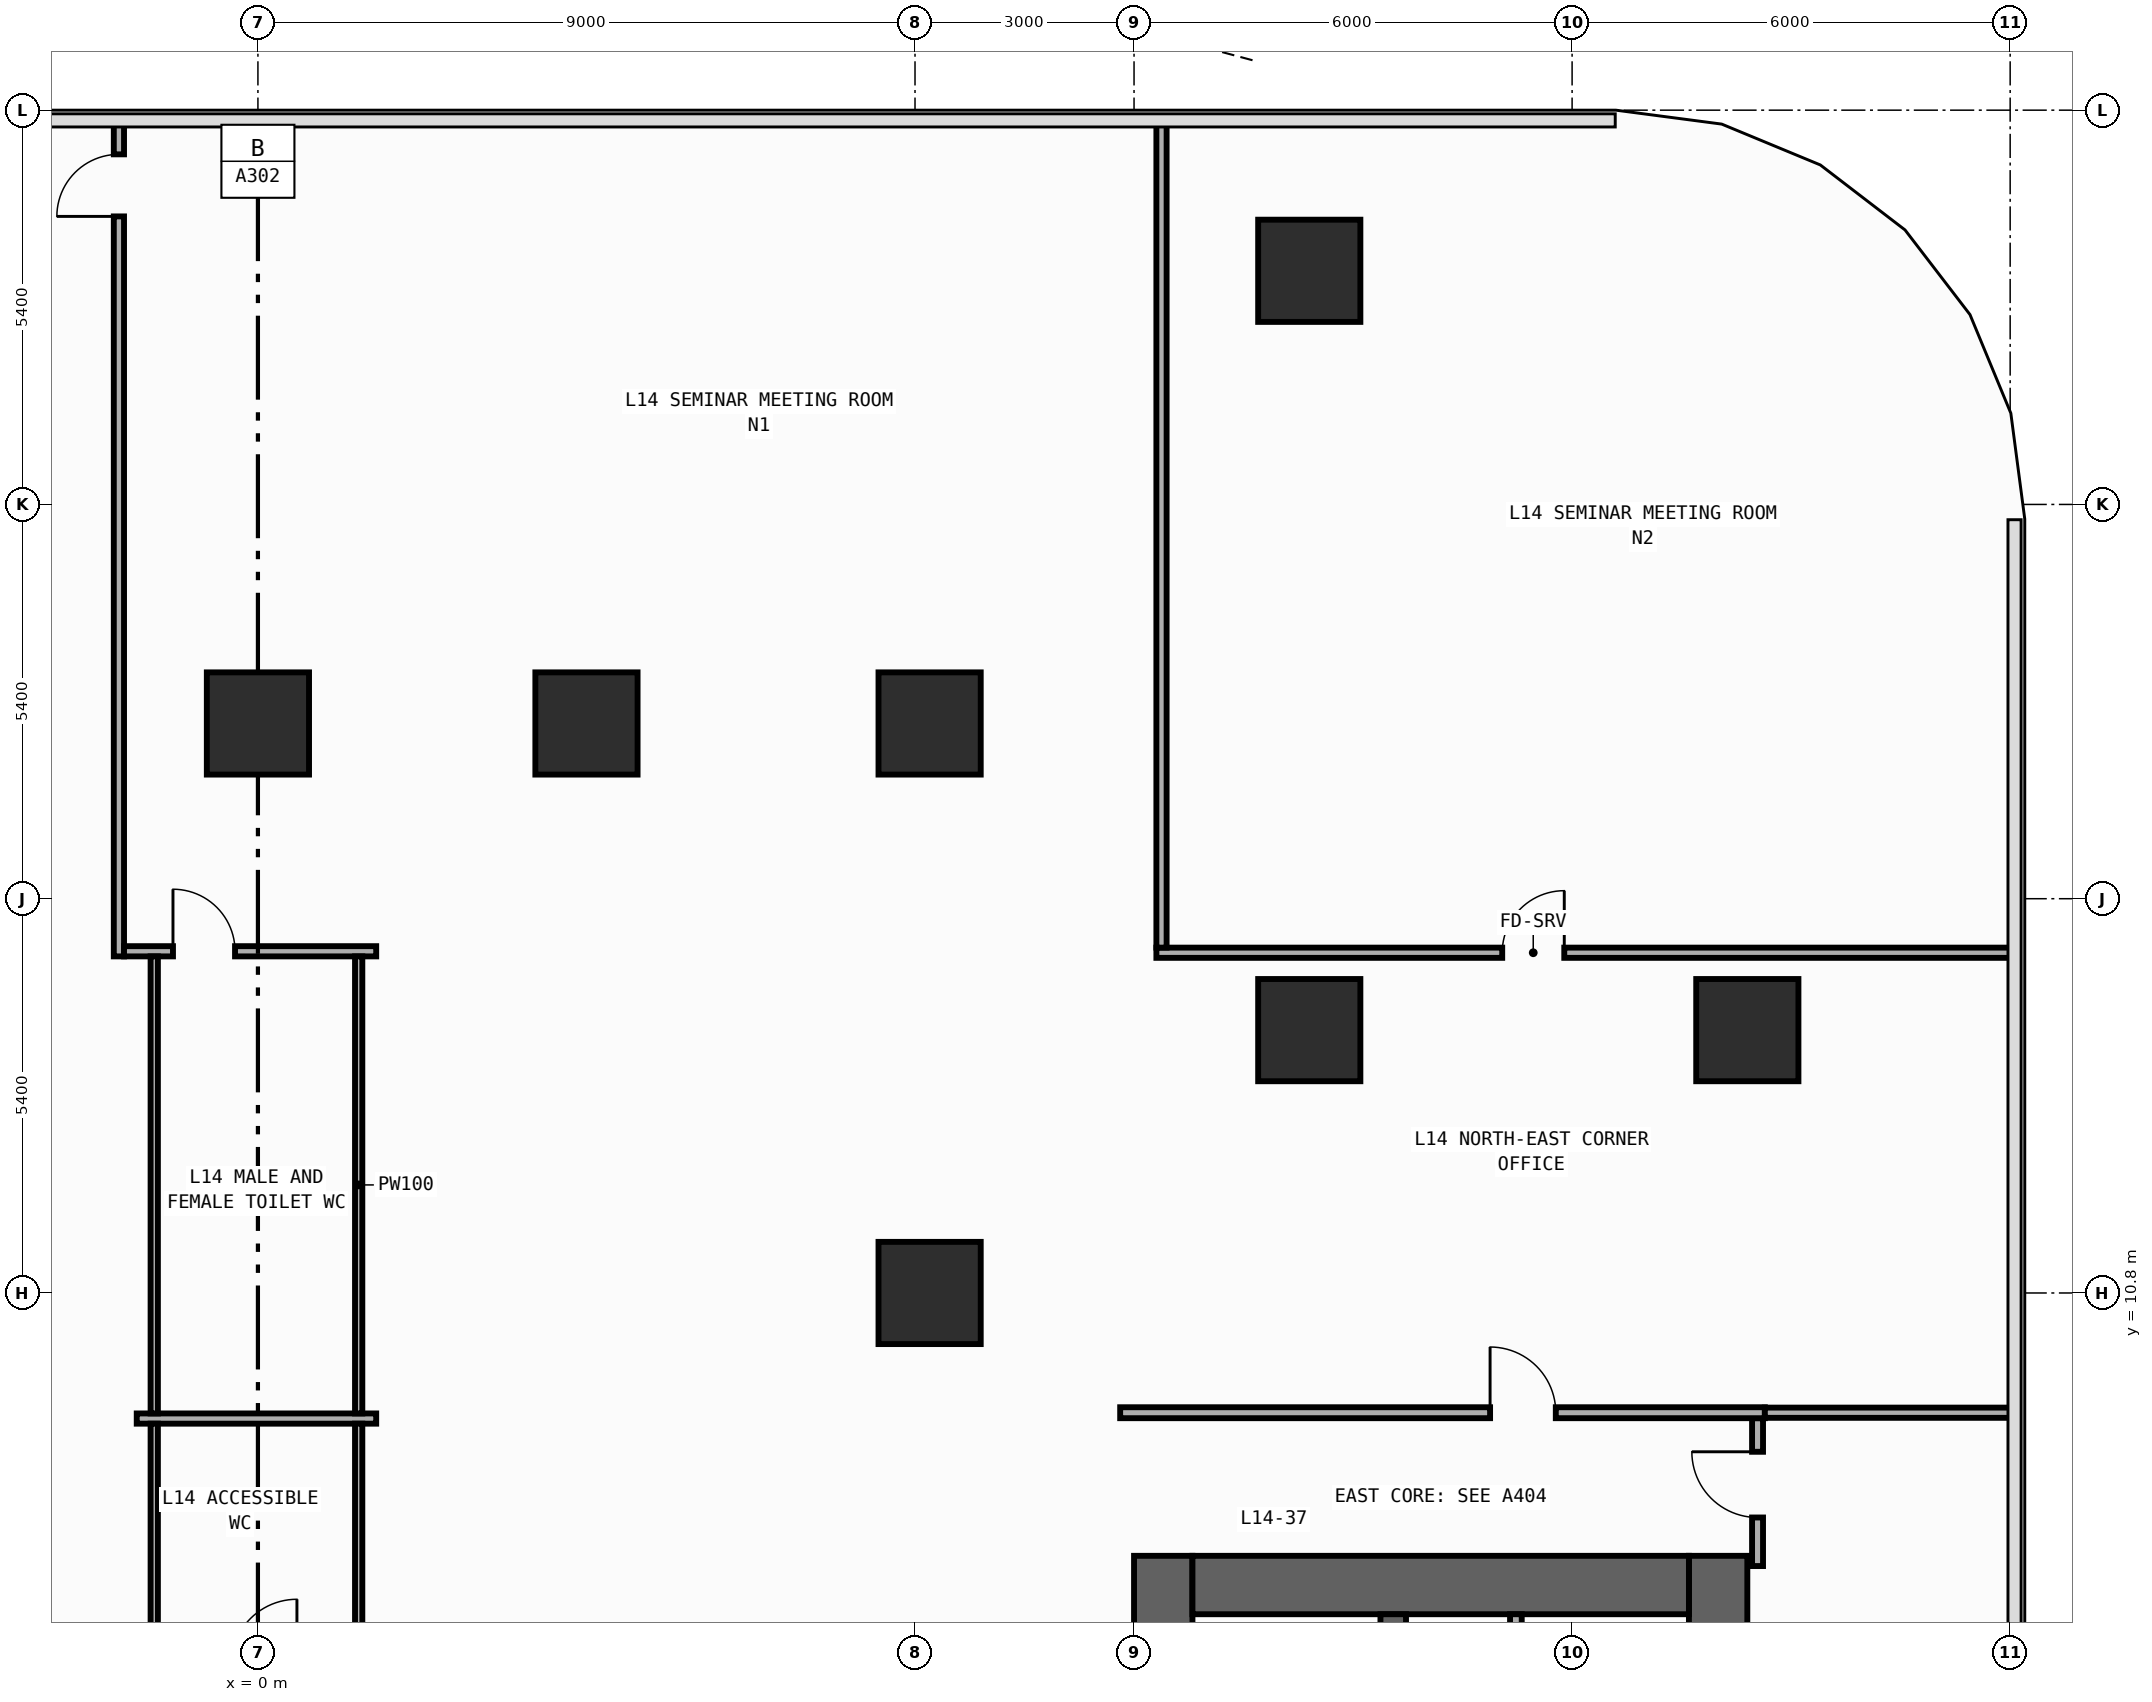
"""IFC4 building model, lengths in metres.
Left out: names, types, materials, properties, quantities, classifications, styles, units other than length and angle.
Written with IfcOpenShell. Run it as: python <this file> out.ifc"""

import sys

from ifc_helpers import new_model, si_unit, direction, frame, frame_2d, origin, origin_2d, place, context, subcontext, project, spatial, rectangle, extrude, element, fill, save


model = new_model("IFC4")
c1 = context("Model", 3, precision=1e-05, world=origin(), true_north=direction((0.0, 1.0)))
c2 = subcontext(c1, "Body", "Model", "MODEL_VIEW")
j1 = project(units=[si_unit("LENGTHUNIT", "METRE"), si_unit("PLANEANGLEUNIT", "RADIAN")], contexts=[c1])
p1 = place(None, origin())
s1 = spatial("IfcSite", under=j1, at=p1, CompositionType="ELEMENT")
p2 = place(p1, origin())
s2 = spatial("IfcBuilding", under=s1, at=p2, CompositionType="ELEMENT")
p3 = place(p2, frame((0.0, 0.0, 59.6)))
s3 = spatial("IfcBuildingStorey", under=s2, at=p3, CompositionType="ELEMENT", Elevation=59.6)
p4 = place(p3, frame((12.4, -19.8, 0.0), z_axis=(0.0, 0.0, 1.0), x_axis=(0.0, 1.0, 0.0)))
e1 = element("IfcWall", 1, at=p4, inside=s3, PredefinedType="SHEAR", context=c2, shape_type="SweptSolid", body=[
    extrude(rectangle(XDim=27.0, YDim=0.8, at=frame_2d((13.5, 0.0))), origin(), (0.0, 0.0, 1.0), 3.94),
])
p5 = place(p4, frame((23.05, 0.0, 0.0)))
e2 = element("IfcOpeningElement", 2, at=p5, cuts=e1, PredefinedType="OPENING", context=c2, shape_type="SweptSolid", body=[
    extrude(rectangle(XDim=1.1, YDim=2.2, at=frame_2d((0.55, 1.1))), frame((0.0, 0.41, 0.0), z_axis=(0.0, -1.0, 0.0), x_axis=(1.0, 0.0, 0.0)), (0.0, 0.0, 1.0), 0.82),
])
p6 = place(p4, frame((19.85, 0.0, 0.0)))
e3 = element("IfcOpeningElement", 3, at=p6, cuts=e1, PredefinedType="OPENING", context=c2, shape_type="SweptSolid", body=[
    extrude(rectangle(XDim=1.1, YDim=2.2, at=frame_2d((0.55, 1.1))), frame((0.0, 0.41, 0.0), z_axis=(0.0, -1.0, 0.0), x_axis=(1.0, 0.0, 0.0)), (0.0, 0.0, 1.0), 0.82),
])
p7 = place(p4, frame((16.65, 0.0, 0.0)))
e4 = element("IfcOpeningElement", 4, at=p7, cuts=e1, PredefinedType="OPENING", context=c2, shape_type="SweptSolid", body=[
    extrude(rectangle(XDim=1.1, YDim=2.2, at=frame_2d((0.55, 1.1))), frame((0.0, 0.41, 0.0), z_axis=(0.0, -1.0, 0.0), x_axis=(1.0, 0.0, 0.0)), (0.0, 0.0, 1.0), 0.82),
])
p8 = place(p4, frame((6.275, 0.0, 0.0)))
e5 = element("IfcOpeningElement", 5, at=p8, cuts=e1, PredefinedType="OPENING", context=c2, shape_type="SweptSolid", body=[
    extrude(rectangle(XDim=0.85, YDim=2.1, at=frame_2d((0.425, 1.05))), frame((0.0, 0.41, 0.0), z_axis=(0.0, -1.0, 0.0), x_axis=(1.0, 0.0, 0.0)), (0.0, 0.0, 1.0), 0.82),
])
p9 = place(p4, frame((8.575, 0.0, 0.0)))
e6 = element("IfcOpeningElement", 6, at=p9, cuts=e1, PredefinedType="OPENING", context=c2, shape_type="SweptSolid", body=[
    extrude(rectangle(XDim=0.85, YDim=2.1, at=frame_2d((0.425, 1.05))), frame((0.0, 0.41, 0.0), z_axis=(0.0, -1.0, 0.0), x_axis=(1.0, 0.0, 0.0)), (0.0, 0.0, 1.0), 0.82),
])
p10 = place(p4, frame((10.675, 0.0, 0.0)))
e7 = element("IfcOpeningElement", 7, at=p10, cuts=e1, PredefinedType="OPENING", context=c2, shape_type="SweptSolid", body=[
    extrude(rectangle(XDim=0.85, YDim=2.1, at=frame_2d((0.425, 1.05))), frame((0.0, 0.41, 0.0), z_axis=(0.0, -1.0, 0.0), x_axis=(1.0, 0.0, 0.0)), (0.0, 0.0, 1.0), 0.82),
])
p11 = place(p4, frame((12.725, 0.0, 0.0)))
e8 = element("IfcOpeningElement", 8, at=p11, cuts=e1, PredefinedType="OPENING", context=c2, shape_type="SweptSolid", body=[
    extrude(rectangle(XDim=1.15, YDim=2.2, at=frame_2d((0.575, 1.1))), frame((0.0, 0.41, 0.0), z_axis=(0.0, -1.0, 0.0), x_axis=(1.0, 0.0, 0.0)), (0.0, 0.0, 1.0), 0.82),
])
p12 = place(p4, frame((25.125, 0.0, 0.0)))
e9 = element("IfcOpeningElement", 9, at=p12, cuts=e1, PredefinedType="OPENING", context=c2, shape_type="SweptSolid", body=[
    extrude(rectangle(XDim=0.85, YDim=2.1, at=frame_2d((0.425, 1.05))), frame((0.0, 0.41, 0.0), z_axis=(0.0, -1.0, 0.0), x_axis=(1.0, 0.0, 0.0)), (0.0, 0.0, 1.0), 0.82),
])
p13 = place(p3, frame((20.0, -19.8, 0.0), z_axis=(0.0, 0.0, 1.0), x_axis=(0.0, 1.0, 0.0)))
e10 = element("IfcWall", 10, at=p13, inside=s3, PredefinedType="SHEAR", context=c2, shape_type="SweptSolid", body=[
    extrude(rectangle(XDim=27.0, YDim=0.8, at=frame_2d((13.5, 0.0))), origin(), (0.0, 0.0, 1.0), 3.94),
])
p14 = place(p3, frame((12.8, 6.8, 0.0), z_axis=(0.0, 0.0, 1.0), x_axis=(1.0, 0.0, 0.0)))
e11 = element("IfcWall", 11, at=p14, inside=s3, PredefinedType="SHEAR", context=c2, shape_type="SweptSolid", body=[
    extrude(rectangle(XDim=6.8, YDim=0.8, at=frame_2d((3.4, 0.0))), origin(), (0.0, 0.0, 1.0), 3.94),
])
p15 = place(p3, frame((15.55, -19.0, 0.0), z_axis=(0.0, 0.0, 1.0), x_axis=(0.0, 1.0, 0.0)))
e12 = element("IfcWall", 12, at=p15, inside=s3, PredefinedType="SHEAR", context=c2, shape_type="SweptSolid", body=[
    extrude(rectangle(XDim=25.4, YDim=0.35, at=frame_2d((12.7, 0.0))), origin(), (0.0, 0.0, 1.0), 3.94),
])
p16 = place(p15, frame((11.925, 0.0, 0.0)))
e13 = element("IfcOpeningElement", 13, at=p16, cuts=e12, PredefinedType="OPENING", context=c2, shape_type="SweptSolid", body=[
    extrude(rectangle(XDim=1.15, YDim=2.2, at=frame_2d((0.575, 1.1))), frame((0.0, 0.185, 0.0), z_axis=(0.0, -1.0, 0.0), x_axis=(1.0, 0.0, 0.0)), (0.0, 0.0, 1.0), 0.37),
])
p17 = place(p15, frame((24.325, 0.0, 0.0)))
e14 = element("IfcOpeningElement", 14, at=p17, cuts=e12, PredefinedType="OPENING", context=c2, shape_type="SweptSolid", body=[
    extrude(rectangle(XDim=0.85, YDim=2.1, at=frame_2d((0.425, 1.05))), frame((0.0, 0.185, 0.0), z_axis=(0.0, -1.0, 0.0), x_axis=(1.0, 0.0, 0.0)), (0.0, 0.0, 1.0), 0.37),
])
for number, where, z_axis, x_axis in (
    (15, (9.2, 10.8, 0.0), (0.0, 0.0, 1.0), (1.0, 0.0, 0.0)),
    (16, (9.2, 18.6, 0.0), (0.0, 0.0, 1.0), (1.0, 0.0, 0.0)),
    (17, (20.4, 14.4, 0.0), (0.0, 0.0, 1.0), (1.0, 0.0, 0.0)),
    (18, (14.4, 14.4, 0.0), (0.0, 0.0, 1.0), (1.0, 0.0, 0.0)),
    (19, (0.0, 18.6, 0.0), (0.0, 0.0, 1.0), (1.0, 0.0, 0.0)),
    (20, (4.5, 18.6, 0.0), (0.0, 0.0, 1.0), (1.0, 0.0, 0.0)),
    (21, (14.4, 24.8, 0.0), (0.0, 0.0, 1.0), (1.0, 0.0, 0.0)),
):
    element("IfcColumn", number, at=place(p3, frame(where, z_axis=z_axis, x_axis=x_axis)), inside=s3, PredefinedType="COLUMN", context=c2, shape_type="SweptSolid", body=[
        extrude(rectangle(XDim=1.4, YDim=1.4, at=origin_2d()), origin(), (0.0, 0.0, 1.0), 4.2),
    ])
p18 = place(p3, frame((17.23, 4.17, 0.0), z_axis=(0.0, 0.0, 1.0), x_axis=(0.0, 1.0, 0.0)))
e22 = element("IfcWall", 22, at=p18, inside=s3, PredefinedType="PARTITIONING", context=c2, shape_type="SweptSolid", body=[
    extrude(rectangle(XDim=2.23, YDim=0.16, at=frame_2d((1.115, 0.0))), origin(), (0.0, 0.0, 1.0), 3.94),
])
p19 = place(p18, frame((0.46, 0.0, 0.0)))
e23 = element("IfcOpeningElement", 23, at=p19, cuts=e22, PredefinedType="OPENING", context=c2, shape_type="SweptSolid", body=[
    extrude(rectangle(XDim=0.85, YDim=2.1, at=frame_2d((0.425, 1.05))), frame((0.0, 0.09, 0.0), z_axis=(0.0, -1.0, 0.0), x_axis=(1.0, 0.0, 0.0)), (0.0, 0.0, 1.0), 0.18),
])
p20 = place(p3, frame((20.54, 7.06, 0.0), z_axis=(0.0, 0.0, 1.0), x_axis=(0.0, 1.0, 0.0)))
e24 = element("IfcWall", 24, at=p20, inside=s3, PredefinedType="PARTITIONING", context=c2, shape_type="SweptSolid", body=[
    extrude(rectangle(XDim=2.025, YDim=0.15, at=frame_2d((1.012, 0.0))), origin(), (0.0, 0.0, 1.0), 3.94),
])
p21 = place(p20, frame((0.665, 0.0, 0.0)))
e25 = element("IfcOpeningElement", 25, at=p21, cuts=e24, PredefinedType="OPENING", context=c2, shape_type="SweptSolid", body=[
    extrude(rectangle(XDim=0.9, YDim=2.15, at=frame_2d((0.45, 1.075))), frame((0.0, 0.085, 0.0), z_axis=(0.0, -1.0, 0.0), x_axis=(1.0, 0.0, 0.0)), (0.0, 0.0, 1.0), 0.17),
])
p22 = place(p3, frame((11.81, 9.16, 0.0), z_axis=(0.0, 0.0, 1.0), x_axis=(1.0, 0.0, 0.0)))
e26 = element("IfcWall", 26, at=p22, inside=s3, PredefinedType="PARTITIONING", context=c2, shape_type="SweptSolid", body=[
    extrude(rectangle(XDim=8.83, YDim=0.15, at=frame_2d((4.415, 0.0))), origin(), (0.0, 0.0, 1.0), 3.94),
])
p23 = place(p22, frame((5.067, 0.0, 0.0)))
e27 = element("IfcOpeningElement", 27, at=p23, cuts=e26, PredefinedType="OPENING", context=c2, shape_type="SweptSolid", body=[
    extrude(rectangle(XDim=0.9, YDim=2.15, at=frame_2d((0.45, 1.075))), frame((0.0, 0.085, 0.0), z_axis=(0.0, -1.0, 0.0), x_axis=(1.0, 0.0, 0.0)), (0.0, 0.0, 1.0), 0.17),
])
p24 = place(p3, frame((20.64, 9.16, 0.0), z_axis=(0.0, 0.0, 1.0), x_axis=(1.0, 0.0, 0.0)))
e28 = element("IfcWall", 28, at=p24, inside=s3, PredefinedType="PARTITIONING", context=c2, shape_type="SweptSolid", body=[
    extrude(rectangle(XDim=3.415, YDim=0.14, at=frame_2d((1.708, 0.0))), origin(), (0.0, 0.0, 1.0), 3.94),
])
p25 = place(p3, frame((12.306, 15.46, 0.0), z_axis=(0.0, 0.0, 1.0), x_axis=(1.0, 0.0, 0.0)))
e29 = element("IfcWall", 29, at=p25, inside=s3, PredefinedType="PARTITIONING", context=c2, shape_type="SweptSolid", body=[
    extrude(rectangle(XDim=11.749, YDim=0.14, at=frame_2d((5.875, 0.0))), origin(), (0.0, 0.0, 1.0), 3.94),
])
p26 = place(p25, frame((4.737, 0.0, 0.0)))
e30 = element("IfcOpeningElement", 30, at=p26, cuts=e29, PredefinedType="OPENING", context=c2, shape_type="SweptSolid", body=[
    extrude(rectangle(XDim=0.85, YDim=2.1, at=frame_2d((0.425, 1.05))), frame((0.0, 0.08, 0.0), z_axis=(0.0, -1.0, 0.0), x_axis=(1.0, 0.0, 0.0)), (0.0, 0.0, 1.0), 0.16),
])
p27 = place(p3, frame((-1.904, 15.41, 0.0), z_axis=(0.0, 0.0, 1.0), x_axis=(0.0, 1.0, 0.0)))
e31 = element("IfcWall", 31, at=p27, inside=s3, PredefinedType="PARTITIONING", context=c2, shape_type="SweptSolid", body=[
    extrude(rectangle(XDim=11.445, YDim=0.14, at=frame_2d((5.723, 0.0))), origin(), (0.0, 0.0, 1.0), 3.94),
])
p28 = place(p27, frame((10.135, 0.0, 0.0)))
e32 = element("IfcOpeningElement", 32, at=p28, cuts=e31, PredefinedType="OPENING", context=c2, shape_type="SweptSolid", body=[
    extrude(rectangle(XDim=0.85, YDim=2.1, at=frame_2d((0.425, 1.05))), frame((0.0, 0.08, 0.0), z_axis=(0.0, -1.0, 0.0), x_axis=(1.0, 0.0, 0.0)), (0.0, 0.0, 1.0), 0.16),
])
p29 = place(p3, frame((12.376, 15.53, 0.0), z_axis=(0.0, 0.0, 1.0), x_axis=(0.0, 1.0, 0.0)))
e33 = element("IfcWall", 33, at=p29, inside=s3, PredefinedType="PARTITIONING", context=c2, shape_type="SweptSolid", body=[
    extrude(rectangle(XDim=11.325, YDim=0.14, at=frame_2d((5.663, 0.0))), origin(), (0.0, 0.0, 1.0), 3.94),
])
p30 = place(p3, frame((-1.834, 15.48, 0.0), z_axis=(0.0, 0.0, 1.0), x_axis=(1.0, 0.0, 0.0)))
e34 = element("IfcWall", 34, at=p30, inside=s3, PredefinedType="PARTITIONING", context=c2, shape_type="SweptSolid", body=[
    extrude(rectangle(XDim=3.454, YDim=0.14, at=frame_2d((1.727, 0.0))), origin(), (0.0, 0.0, 1.0), 3.94),
])
p31 = place(p30, frame((0.67, 0.0, 0.0)))
e35 = element("IfcOpeningElement", 35, at=p31, cuts=e34, PredefinedType="OPENING", context=c2, shape_type="SweptSolid", body=[
    extrude(rectangle(XDim=0.85, YDim=2.1, at=frame_2d((0.425, 1.05))), frame((0.0, 0.08, 0.0), z_axis=(0.0, -1.0, 0.0), x_axis=(1.0, 0.0, 0.0)), (0.0, 0.0, 1.0), 0.16),
])
p32 = place(p3, frame((-1.66, 9.08, 0.0), z_axis=(0.0, 0.0, 1.0), x_axis=(1.0, 0.0, 0.0)))
e36 = element("IfcWall", 36, at=p32, inside=s3, PredefinedType="PARTITIONING", context=c2, shape_type="SweptSolid", body=[
    extrude(rectangle(XDim=3.28, YDim=0.14, at=frame_2d((1.64, 0.0))), origin(), (0.0, 0.0, 1.0), 3.94),
])
for number, where, z_axis, x_axis in (
    (37, (1.38, 9.01, 0.0), (0.0, 0.0, 1.0), (0.0, -1.0, 0.0)),
    (38, (-1.42, 5.78, 0.0), (0.0, 0.0, 1.0), (0.0, 1.0, 0.0)),
):
    element("IfcWall", number, at=place(p3, frame(where, z_axis=z_axis, x_axis=x_axis)), inside=s3, PredefinedType="PARTITIONING", context=c2, shape_type="SweptSolid", body=[
        extrude(rectangle(XDim=3.23, YDim=0.1, at=frame_2d((1.615, 0.0))), origin(), (0.0, 0.0, 1.0), 3.94),
    ])
for number, where, z_axis, x_axis in (
    (39, (1.38, 15.41, 0.0), (0.0, 0.0, 1.0), (0.0, -1.0, 0.0)),
    (40, (-1.42, 9.15, 0.0), (0.0, 0.0, 1.0), (0.0, 1.0, 0.0)),
):
    element("IfcWall", number, at=place(p3, frame(where, z_axis=z_axis, x_axis=x_axis)), inside=s3, PredefinedType="PARTITIONING", context=c2, shape_type="SweptSolid", body=[
        extrude(rectangle(XDim=6.26, YDim=0.1, at=frame_2d((3.13, 0.0))), origin(), (0.0, 0.0, 1.0), 3.94),
    ])
p33 = place(p21, origin())
e41 = element("IfcDoor", 41, at=p33, inside=s3, OperationType="SINGLE_SWING_RIGHT", PredefinedType="DOOR", context=c2, shape_type="SweptSolid", body=[
    extrude(rectangle(XDim=0.9, YDim=2.15, at=frame_2d((0.45, 1.075))), frame((0.0, 0.025, 0.0), z_axis=(0.0, -1.0, 0.0), x_axis=(1.0, 0.0, 0.0)), (0.0, 0.0, 1.0), 0.05),
])
fill(e25, e41)
p34 = place(p23, origin())
e42 = element("IfcDoor", 42, at=p34, inside=s3, OperationType="SINGLE_SWING_LEFT", PredefinedType="DOOR", context=c2, shape_type="SweptSolid", body=[
    extrude(rectangle(XDim=0.9, YDim=2.15, at=frame_2d((0.45, 1.075))), frame((0.0, 0.025, 0.0), z_axis=(0.0, -1.0, 0.0), x_axis=(1.0, 0.0, 0.0)), (0.0, 0.0, 1.0), 0.05),
])
fill(e27, e42)
p35 = place(p26, origin())
e43 = element("IfcDoor", 43, at=p35, inside=s3, OperationType="SINGLE_SWING_RIGHT", PredefinedType="DOOR", context=c2, shape_type="SweptSolid", body=[
    extrude(rectangle(XDim=0.85, YDim=2.1, at=frame_2d((0.425, 1.05))), frame((0.0, 0.025, 0.0), z_axis=(0.0, -1.0, 0.0), x_axis=(1.0, 0.0, 0.0)), (0.0, 0.0, 1.0), 0.05),
])
fill(e30, e43)
p36 = place(p28, origin())
e44 = element("IfcDoor", 44, at=p36, inside=s3, OperationType="SINGLE_SWING_LEFT", PredefinedType="DOOR", context=c2, shape_type="SweptSolid", body=[
    extrude(rectangle(XDim=0.85, YDim=2.1, at=frame_2d((0.425, 1.05))), frame((0.0, 0.025, 0.0), z_axis=(0.0, -1.0, 0.0), x_axis=(1.0, 0.0, 0.0)), (0.0, 0.0, 1.0), 0.05),
])
fill(e32, e44)
p37 = place(p31, origin())
e45 = element("IfcDoor", 45, at=p37, inside=s3, OperationType="SINGLE_SWING_LEFT", PredefinedType="DOOR", context=c2, shape_type="SweptSolid", body=[
    extrude(rectangle(XDim=0.85, YDim=2.1, at=frame_2d((0.425, 1.05))), frame((0.0, 0.025, 0.0), z_axis=(0.0, -1.0, 0.0), x_axis=(1.0, 0.0, 0.0)), (0.0, 0.0, 1.0), 0.05),
])
fill(e35, e45)
save(model, sys.argv[1])
